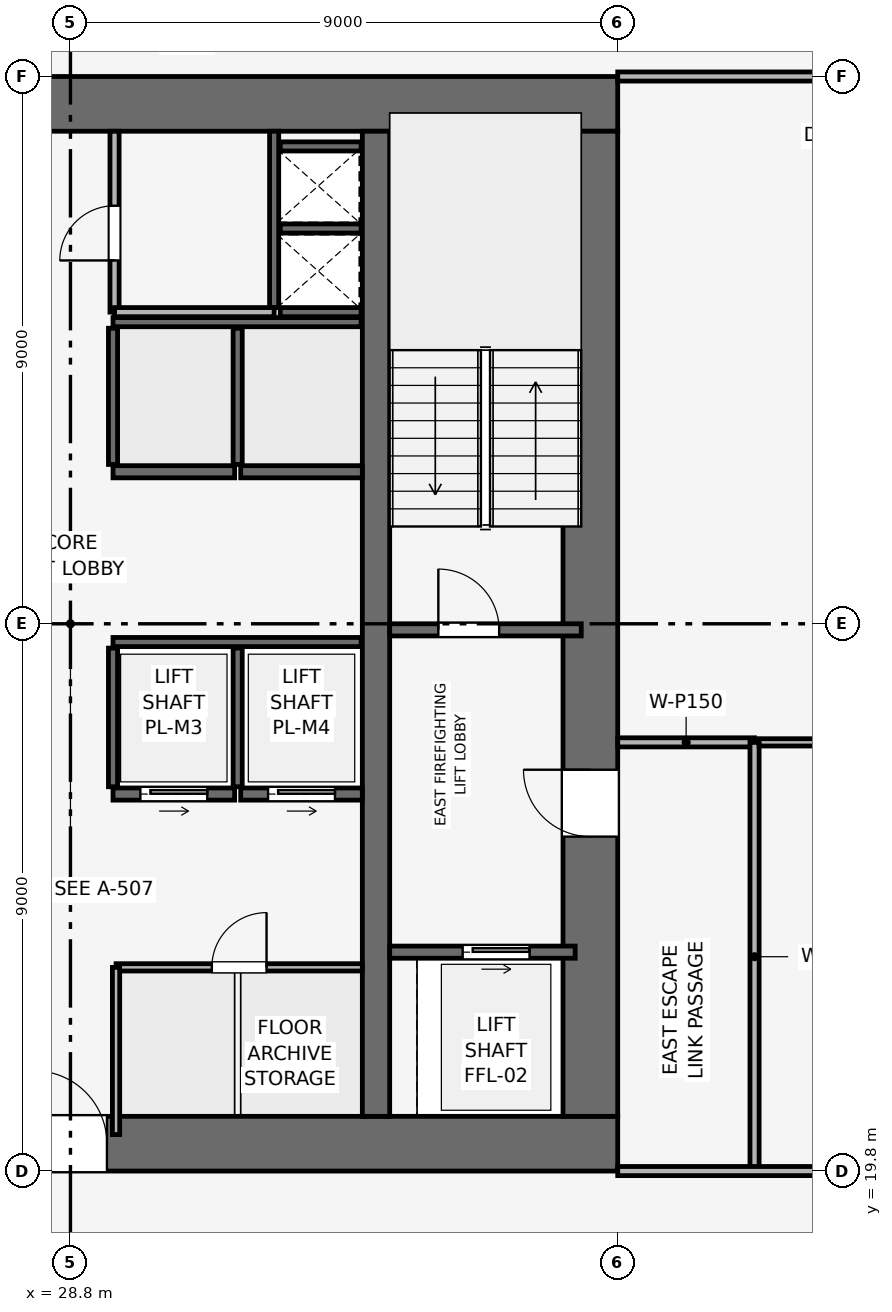
"""IFC4 building model, lengths in metres.
Left out: names, types, materials, properties, quantities, classifications, styles, units other than length and angle.
Written with IfcOpenShell. Run it as: python <this file> out.ifc"""

import sys

from ifc_helpers import new_model, si_unit, direction, frame, frame_2d, origin, place, context, subcontext, project, spatial, rectangle, extrude, element, fill, save


model = new_model("IFC4")
c1 = context("Model", 3, precision=1e-05, world=origin(), true_north=direction((0.0, 1.0)))
c2 = subcontext(c1, "Body", "Model", "MODEL_VIEW")
j1 = project(units=[si_unit("LENGTHUNIT", "METRE"), si_unit("PLANEANGLEUNIT", "RADIAN")], contexts=[c1])
p1 = place(None, origin())
s1 = spatial("IfcSite", under=j1, at=p1, CompositionType="ELEMENT")
p2 = place(p1, origin())
s2 = spatial("IfcBuilding", under=s1, at=p2, CompositionType="ELEMENT")
p3 = place(p2, frame((0.0, 0.0, 145.8)))
s3 = spatial("IfcBuildingStorey", under=s2, at=p3, CompositionType="ELEMENT", Elevation=145.8)
p4 = place(p3, frame((19.8, 20.25, 0.0), z_axis=(0.0, 0.0, 1.0), x_axis=(1.0, 0.0, 0.0)))
e1 = element("IfcWall", 1, at=p4, inside=s3, PredefinedType="SHEAR", context=c2, shape_type="SweptSolid", body=[
    extrude(rectangle(XDim=18.0, YDim=0.9, at=frame_2d((9.0, 0.0))), origin(), (0.0, 0.0, 1.0), 3.75),
])
p5 = place(p4, frame((8.4, 0.0, 0.0)))
e2 = element("IfcOpeningElement", 2, at=p5, cuts=e1, PredefinedType="OPENING", context=c2, shape_type="SweptSolid", body=[
    extrude(rectangle(XDim=1.2, YDim=2.2, at=frame_2d((0.6, 1.1))), frame((0.0, 0.46, 0.0), z_axis=(0.0, -1.0, 0.0), x_axis=(1.0, 0.0, 0.0)), (0.0, 0.0, 1.0), 0.92),
])
p6 = place(p3, frame((19.8, 37.35, 0.0), z_axis=(0.0, 0.0, 1.0), x_axis=(1.0, 0.0, 0.0)))
e3 = element("IfcWall", 3, at=p6, inside=s3, PredefinedType="SHEAR", context=c2, shape_type="SweptSolid", body=[
    extrude(rectangle(XDim=18.0, YDim=0.9, at=frame_2d((9.0, 0.0))), origin(), (0.0, 0.0, 1.0), 3.75),
])
p7 = place(p6, frame((7.05, 0.0, 0.0)))
e4 = element("IfcOpeningElement", 4, at=p7, cuts=e3, PredefinedType="OPENING", context=c2, shape_type="SweptSolid", body=[
    extrude(rectangle(XDim=1.1, YDim=2.15, at=frame_2d((0.55, 1.075))), frame((0.0, 0.46, 0.0), z_axis=(0.0, -1.0, 0.0), x_axis=(1.0, 0.0, 0.0)), (0.0, 0.0, 1.0), 0.92),
])
p8 = place(p3, frame((37.35, 20.7, 0.0), z_axis=(0.0, 0.0, 1.0), x_axis=(0.0, 1.0, 0.0)))
e5 = element("IfcWall", 5, at=p8, inside=s3, PredefinedType="SHEAR", context=c2, shape_type="SweptSolid", body=[
    extrude(rectangle(XDim=16.2, YDim=0.9, at=frame_2d((8.1, 0.0))), origin(), (0.0, 0.0, 1.0), 3.75),
])
p9 = place(p8, frame((4.6, 0.0, 0.0)))
e6 = element("IfcOpeningElement", 6, at=p9, cuts=e5, PredefinedType="OPENING", context=c2, shape_type="SweptSolid", body=[
    extrude(rectangle(XDim=1.1, YDim=2.15, at=frame_2d((0.55, 1.075))), frame((0.0, 0.46, 0.0), z_axis=(0.0, -1.0, 0.0), x_axis=(1.0, 0.0, 0.0)), (0.0, 0.0, 1.0), 0.92),
])
p10 = place(p3, frame((33.825, 20.7, 0.0), z_axis=(0.0, 0.0, 1.0), x_axis=(0.0, 1.0, 0.0)))
e7 = element("IfcWall", 7, at=p10, inside=s3, PredefinedType="SHEAR", context=c2, shape_type="SweptSolid", body=[
    extrude(rectangle(XDim=16.2, YDim=0.45, at=frame_2d((8.1, 0.0))), origin(), (0.0, 0.0, 1.0), 3.75),
])
p11 = place(p3, frame((34.05, 28.7, 0.0), z_axis=(0.0, 0.0, 1.0), x_axis=(1.0, 0.0, 0.0)))
e8 = element("IfcWall", 8, at=p11, inside=s3, PredefinedType="SHEAR", context=c2, shape_type="SweptSolid", body=[
    extrude(rectangle(XDim=3.15, YDim=0.2, at=frame_2d((1.575, 0.0))), origin(), (0.0, 0.0, 1.0), 3.495),
])
p12 = place(p11, frame((0.8, 0.0, 0.0)))
e9 = element("IfcOpeningElement", 9, at=p12, cuts=e8, PredefinedType="OPENING", context=c2, shape_type="SweptSolid", body=[
    extrude(rectangle(XDim=1.0, YDim=2.1, at=frame_2d((0.5, 1.05))), frame((0.0, 0.11, 0.0), z_axis=(0.0, -1.0, 0.0), x_axis=(1.0, 0.0, 0.0)), (0.0, 0.0, 1.0), 0.22),
])
p13 = place(p3, frame((32.15, 34.0, 0.0), z_axis=(0.0, 0.0, 1.0), x_axis=(0.0, 1.0, 0.0)))
e10 = element("IfcWall", 10, at=p13, inside=s3, PredefinedType="SHEAR", context=c2, shape_type="SweptSolid", body=[
    extrude(rectangle(XDim=2.9, YDim=0.15, at=frame_2d((1.45, 0.0))), origin(), (0.0, 0.0, 1.0), 3.495),
])
for number, where, z_axis, x_axis in (
    (11, (32.25, 33.925, 0.0), (0.0, 0.0, 1.0), (1.0, 0.0, 0.0)),
    (12, (32.25, 35.3, 0.0), (0.0, 0.0, 1.0), (1.0, 0.0, 0.0)),
):
    element("IfcWall", number, at=place(p3, frame(where, z_axis=z_axis, x_axis=x_axis)), inside=s3, PredefinedType="SHEAR", context=c2, shape_type="SweptSolid", body=[
        extrude(rectangle(XDim=1.33, YDim=0.15, at=frame_2d((0.665, 0.0))), origin(), (0.0, 0.0, 1.0), 3.495),
    ])
p14 = place(p3, frame((34.05, 23.4, 0.0), z_axis=(0.0, 0.0, 1.0), x_axis=(1.0, 0.0, 0.0)))
e13 = element("IfcWall", 13, at=p14, inside=s3, PredefinedType="SHEAR", context=c2, shape_type="SweptSolid", body=[
    extrude(rectangle(XDim=3.05, YDim=0.2, at=frame_2d((1.525, 0.0))), origin(), (0.0, 0.0, 1.0), 3.495),
])
p15 = place(p14, frame((1.2, 0.0, 0.0)))
e14 = element("IfcOpeningElement", 14, at=p15, cuts=e13, PredefinedType="OPENING", context=c2, shape_type="SweptSolid", body=[
    extrude(rectangle(XDim=1.1, YDim=2.15, at=frame_2d((0.55, 1.075))), frame((0.0, 0.11, 0.0), z_axis=(0.0, -1.0, 0.0), x_axis=(1.0, 0.0, 0.0)), (0.0, 0.0, 1.0), 0.22),
])
p16 = place(p3, frame((29.5, 26.0, 0.0), z_axis=(0.0, 0.0, 1.0), x_axis=(1.0, 0.0, 0.0)))
e15 = element("IfcWall", 15, at=p16, inside=s3, PredefinedType="SHEAR", context=c2, shape_type="SweptSolid", body=[
    extrude(rectangle(XDim=2.0, YDim=0.2, at=frame_2d((1.0, 0.0))), origin(), (0.0, 0.0, 1.0), 3.495),
])
p17 = place(p16, frame((0.45, 0.0, 0.0)))
e16 = element("IfcOpeningElement", 16, at=p17, cuts=e15, PredefinedType="OPENING", context=c2, shape_type="SweptSolid", body=[
    extrude(rectangle(XDim=1.1, YDim=2.15, at=frame_2d((0.55, 1.075))), frame((0.0, 0.11, 0.0), z_axis=(0.0, -1.0, 0.0), x_axis=(1.0, 0.0, 0.0)), (0.0, 0.0, 1.0), 0.22),
])
p18 = place(p3, frame((31.6, 26.0, 0.0), z_axis=(0.0, 0.0, 1.0), x_axis=(1.0, 0.0, 0.0)))
e17 = element("IfcWall", 17, at=p18, inside=s3, PredefinedType="SHEAR", context=c2, shape_type="SweptSolid", body=[
    extrude(rectangle(XDim=2.0, YDim=0.2, at=frame_2d((1.0, 0.0))), origin(), (0.0, 0.0, 1.0), 3.495),
])
p19 = place(p18, frame((0.45, 0.0, 0.0)))
e18 = element("IfcOpeningElement", 18, at=p19, cuts=e17, PredefinedType="OPENING", context=c2, shape_type="SweptSolid", body=[
    extrude(rectangle(XDim=1.1, YDim=2.15, at=frame_2d((0.55, 1.075))), frame((0.0, 0.11, 0.0), z_axis=(0.0, -1.0, 0.0), x_axis=(1.0, 0.0, 0.0)), (0.0, 0.0, 1.0), 0.22),
])
for number, where, z_axis, x_axis in (
    (19, (29.5, 31.3, 0.0), (0.0, 0.0, 1.0), (1.0, 0.0, 0.0)),
    (20, (31.6, 31.3, 0.0), (0.0, 0.0, 1.0), (1.0, 0.0, 0.0)),
):
    element("IfcWall", number, at=place(p3, frame(where, z_axis=z_axis, x_axis=x_axis)), inside=s3, PredefinedType="SHEAR", context=c2, shape_type="SweptSolid", body=[
        extrude(rectangle(XDim=2.0, YDim=0.2, at=frame_2d((1.0, 0.0))), origin(), (0.0, 0.0, 1.0), 3.495),
    ])
p20 = place(p3, frame((32.25, 36.65, 0.0), z_axis=(0.0, 0.0, 1.0), x_axis=(1.0, 0.0, 0.0)))
e21 = element("IfcWall", 21, at=p20, inside=s3, PredefinedType="SHEAR", context=c2, shape_type="SweptSolid", body=[
    extrude(rectangle(XDim=1.33, YDim=0.15, at=frame_2d((0.665, 0.0))), origin(), (0.0, 0.0, 1.0), 3.495),
])
p21 = place(p3, frame((29.5, 28.5, 0.0), z_axis=(0.0, 0.0, 1.0), x_axis=(1.0, 0.0, 0.0)))
e22 = element("IfcWall", 22, at=p21, inside=s3, PredefinedType="SHEAR", context=c2, shape_type="SweptSolid", body=[
    extrude(rectangle(XDim=4.08, YDim=0.15, at=frame_2d((2.04, 0.0))), origin(), (0.0, 0.0, 1.0), 3.495),
])
for number, where, z_axis, x_axis in (
    (23, (29.5, 26.12, 0.0), (0.0, 0.0, 1.0), (0.0, 1.0, 0.0)),
    (24, (31.55, 26.12, 0.0), (0.0, 0.0, 1.0), (0.0, 1.0, 0.0)),
):
    element("IfcWall", number, at=place(p3, frame(where, z_axis=z_axis, x_axis=x_axis)), inside=s3, PredefinedType="SHEAR", context=c2, shape_type="SweptSolid", body=[
        extrude(rectangle(XDim=2.28, YDim=0.15, at=frame_2d((1.14, 0.0))), origin(), (0.0, 0.0, 1.0), 3.495),
    ])
p22 = place(p3, frame((29.5, 33.76, 0.0), z_axis=(0.0, 0.0, 1.0), x_axis=(1.0, 0.0, 0.0)))
e25 = element("IfcWall", 25, at=p22, inside=s3, PredefinedType="SHEAR", context=c2, shape_type="SweptSolid", body=[
    extrude(rectangle(XDim=4.08, YDim=0.15, at=frame_2d((2.04, 0.0))), origin(), (0.0, 0.0, 1.0), 3.495),
])
for number, where, z_axis, x_axis in (
    (26, (29.5, 31.42, 0.0), (0.0, 0.0, 1.0), (0.0, 1.0, 0.0)),
    (27, (31.55, 31.42, 0.0), (0.0, 0.0, 1.0), (0.0, 1.0, 0.0)),
):
    element("IfcWall", number, at=place(p3, frame(where, z_axis=z_axis, x_axis=x_axis)), inside=s3, PredefinedType="SHEAR", context=c2, shape_type="SweptSolid", body=[
        extrude(rectangle(XDim=2.24, YDim=0.15, at=frame_2d((1.12, 0.0))), origin(), (0.0, 0.0, 1.0), 3.495),
    ])
p23 = place(p3, frame((29.525, 33.925, 0.0), z_axis=(0.0, 0.0, 1.0), x_axis=(0.0, 1.0, 0.0)))
e28 = element("IfcWall", 28, at=p23, inside=s3, PredefinedType="PARTITIONING", context=c2, shape_type="SweptSolid", body=[
    extrude(rectangle(XDim=2.975, YDim=0.15, at=frame_2d((1.487, 0.0))), origin(), (0.0, 0.0, 1.0), 3.495),
])
p24 = place(p23, frame((0.85, 0.0, 0.0)))
e29 = element("IfcOpeningElement", 29, at=p24, cuts=e28, PredefinedType="OPENING", context=c2, shape_type="SweptSolid", body=[
    extrude(rectangle(XDim=0.9, YDim=2.1, at=frame_2d((0.45, 1.05))), frame((0.0, 0.085, 0.0), z_axis=(0.0, -1.0, 0.0), x_axis=(1.0, 0.0, 0.0)), (0.0, 0.0, 1.0), 0.17),
])
p25 = place(p3, frame((29.525, 33.925, 0.0), z_axis=(0.0, 0.0, 1.0), x_axis=(1.0, 0.0, 0.0)))
e30 = element("IfcWall", 30, at=p25, inside=s3, PredefinedType="PARTITIONING", context=c2, shape_type="SweptSolid", body=[
    extrude(rectangle(XDim=2.625, YDim=0.15, at=frame_2d((1.312, 0.0))), origin(), (0.0, 0.0, 1.0), 3.495),
])
p26 = place(p3, frame((29.55, 23.15, 0.0), z_axis=(0.0, 0.0, 1.0), x_axis=(1.0, 0.0, 0.0)))
e31 = element("IfcWall", 31, at=p26, inside=s3, PredefinedType="PARTITIONING", context=c2, shape_type="SweptSolid", body=[
    extrude(rectangle(XDim=4.05, YDim=0.12, at=frame_2d((2.025, 0.0))), origin(), (0.0, 0.0, 1.0), 3.495),
])
p27 = place(p26, frame((1.575, 0.0, 0.0)))
e32 = element("IfcOpeningElement", 32, at=p27, cuts=e31, PredefinedType="OPENING", context=c2, shape_type="SweptSolid", body=[
    extrude(rectangle(XDim=0.9, YDim=2.1, at=frame_2d((0.45, 1.05))), frame((0.0, 0.07, 0.0), z_axis=(0.0, -1.0, 0.0), x_axis=(1.0, 0.0, 0.0)), (0.0, 0.0, 1.0), 0.14),
])
p28 = place(p3, frame((29.55, 20.4, 0.0), z_axis=(0.0, 0.0, 1.0), x_axis=(0.0, 1.0, 0.0)))
e33 = element("IfcWall", 33, at=p28, inside=s3, PredefinedType="PARTITIONING", context=c2, shape_type="SweptSolid", body=[
    extrude(rectangle(XDim=2.75, YDim=0.12, at=frame_2d((1.375, 0.0))), origin(), (0.0, 0.0, 1.0), 3.495),
])
p29 = place(p3, frame((37.8, 26.85, 0.0), z_axis=(0.0, 0.0, 1.0), x_axis=(1.0, 0.0, 0.0)))
e34 = element("IfcWall", 34, at=p29, inside=s3, PredefinedType="PARTITIONING", context=c2, shape_type="SweptSolid", body=[
    extrude(rectangle(XDim=2.25, YDim=0.15, at=frame_2d((1.125, 0.0))), origin(), (0.0, 0.0, 1.0), 3.495),
])
p30 = place(p3, frame((40.05, 19.8, 0.0), z_axis=(0.0, 0.0, 1.0), x_axis=(0.0, 1.0, 0.0)))
e35 = element("IfcWall", 35, at=p30, inside=s3, PredefinedType="PARTITIONING", context=c2, shape_type="SweptSolid", body=[
    extrude(rectangle(XDim=7.05, YDim=0.15, at=frame_2d((3.525, 0.0))), origin(), (0.0, 0.0, 1.0), 3.03),
])
p31 = place(p3, frame((40.125, 26.85, 0.0), z_axis=(0.0, 0.0, 1.0), x_axis=(1.0, 0.0, 0.0)))
e36 = element("IfcWall", 36, at=p31, inside=s3, PredefinedType="PARTITIONING", context=c2, shape_type="SweptSolid", body=[
    extrude(rectangle(XDim=12.845, YDim=0.12, at=frame_2d((6.422, 0.0))), origin(), (0.0, 0.0, 1.0), 2.98),
])
p32 = place(p3, frame((37.8, 19.8, 0.0), z_axis=(0.0, 0.0, 1.0), x_axis=(1.0, 0.0, 0.0)))
e37 = element("IfcWall", 37, at=p32, inside=s3, PredefinedType="PARTITIONING", context=c2, shape_type="SweptSolid", body=[
    extrude(rectangle(XDim=15.17, YDim=0.15, at=frame_2d((7.585, 0.0))), origin(), (0.0, 0.0, 1.0), 2.98),
])
p33 = place(p32, frame((4.4, 0.0, 0.0)))
e38 = element("IfcOpeningElement", 38, at=p33, cuts=e37, PredefinedType="OPENING", context=c2, shape_type="SweptSolid", body=[
    extrude(rectangle(XDim=0.9, YDim=2.1, at=frame_2d((0.45, 1.05))), frame((0.0, 0.085, 0.0), z_axis=(0.0, -1.0, 0.0), x_axis=(1.0, 0.0, 0.0)), (0.0, 0.0, 1.0), 0.17),
])
p34 = place(p3, frame((37.8, 37.8, 0.0), z_axis=(0.0, 0.0, 1.0), x_axis=(1.0, 0.0, 0.0)))
e39 = element("IfcWall", 39, at=p34, inside=s3, PredefinedType="PARTITIONING", context=c2, shape_type="SweptSolid", body=[
    extrude(rectangle(XDim=15.17, YDim=0.15, at=frame_2d((7.585, 0.0))), origin(), (0.0, 0.0, 1.0), 2.98),
])
p35 = place(p34, frame((3.4, 0.0, 0.0)))
e40 = element("IfcOpeningElement", 40, at=p35, cuts=e39, PredefinedType="OPENING", context=c2, shape_type="SweptSolid", body=[
    extrude(rectangle(XDim=0.9, YDim=2.1, at=frame_2d((0.45, 1.05))), frame((0.0, 0.085, 0.0), z_axis=(0.0, -1.0, 0.0), x_axis=(1.0, 0.0, 0.0)), (0.0, 0.0, 1.0), 0.17),
])
p36 = place(p12, origin())
e41 = element("IfcDoor", 41, at=p36, inside=s3, OperationType="SINGLE_SWING_LEFT", PredefinedType="DOOR", context=c2, shape_type="SweptSolid", body=[
    extrude(rectangle(XDim=1.0, YDim=2.1, at=frame_2d((0.5, 1.05))), frame((0.0, 0.025, 0.0), z_axis=(0.0, -1.0, 0.0), x_axis=(1.0, 0.0, 0.0)), (0.0, 0.0, 1.0), 0.05),
])
fill(e9, e41)
p37 = place(p15, origin())
e42 = element("IfcDoor", 42, at=p37, inside=s3, OperationType="SLIDING_TO_RIGHT", PredefinedType="DOOR", context=c2, shape_type="SweptSolid", body=[
    extrude(rectangle(XDim=1.1, YDim=2.15, at=frame_2d((0.55, 1.075))), frame((0.0, 0.025, 0.0), z_axis=(0.0, -1.0, 0.0), x_axis=(1.0, 0.0, 0.0)), (0.0, 0.0, 1.0), 0.05),
])
fill(e14, e42)
p38 = place(p17, origin())
e43 = element("IfcDoor", 43, at=p38, inside=s3, OperationType="SLIDING_TO_RIGHT", PredefinedType="DOOR", context=c2, shape_type="SweptSolid", body=[
    extrude(rectangle(XDim=1.1, YDim=2.15, at=frame_2d((0.55, 1.075))), frame((0.0, 0.025, 0.0), z_axis=(0.0, -1.0, 0.0), x_axis=(1.0, 0.0, 0.0)), (0.0, 0.0, 1.0), 0.05),
])
fill(e16, e43)
p39 = place(p19, origin())
e44 = element("IfcDoor", 44, at=p39, inside=s3, OperationType="SLIDING_TO_RIGHT", PredefinedType="DOOR", context=c2, shape_type="SweptSolid", body=[
    extrude(rectangle(XDim=1.1, YDim=2.15, at=frame_2d((0.55, 1.075))), frame((0.0, 0.025, 0.0), z_axis=(0.0, -1.0, 0.0), x_axis=(1.0, 0.0, 0.0)), (0.0, 0.0, 1.0), 0.05),
])
fill(e18, e44)
p40 = place(p24, origin())
e45 = element("IfcDoor", 45, at=p40, inside=s3, OperationType="SINGLE_SWING_LEFT", PredefinedType="DOOR", context=c2, shape_type="SweptSolid", body=[
    extrude(rectangle(XDim=0.9, YDim=2.1, at=frame_2d((0.45, 1.05))), frame((0.0, 0.025, 0.0), z_axis=(0.0, -1.0, 0.0), x_axis=(1.0, 0.0, 0.0)), (0.0, 0.0, 1.0), 0.05),
])
fill(e29, e45)
p41 = place(p27, origin())
e46 = element("IfcDoor", 46, at=p41, inside=s3, OperationType="SINGLE_SWING_RIGHT", PredefinedType="DOOR", context=c2, shape_type="SweptSolid", body=[
    extrude(rectangle(XDim=0.9, YDim=2.1, at=frame_2d((0.45, 1.05))), frame((0.0, 0.025, 0.0), z_axis=(0.0, -1.0, 0.0), x_axis=(1.0, 0.0, 0.0)), (0.0, 0.0, 1.0), 0.05),
])
fill(e32, e46)
p42 = place(p9, origin())
e47 = element("IfcDoor", 47, at=p42, inside=s3, OperationType="SINGLE_SWING_RIGHT", PredefinedType="DOOR", context=c2, shape_type="SweptSolid", body=[
    extrude(rectangle(XDim=1.1, YDim=2.15, at=frame_2d((0.55, 1.075))), frame((0.0, 0.025, 0.0), z_axis=(0.0, -1.0, 0.0), x_axis=(1.0, 0.0, 0.0)), (0.0, 0.0, 1.0), 0.05),
])
fill(e6, e47)
p43 = place(p5, origin())
e48 = element("IfcDoor", 48, at=p43, inside=s3, OperationType="SINGLE_SWING_LEFT", PredefinedType="DOOR", context=c2, shape_type="SweptSolid", body=[
    extrude(rectangle(XDim=1.2, YDim=2.2, at=frame_2d((0.6, 1.1))), frame((0.0, 0.025, 0.0), z_axis=(0.0, -1.0, 0.0), x_axis=(1.0, 0.0, 0.0)), (0.0, 0.0, 1.0), 0.05),
])
fill(e2, e48)
save(model, sys.argv[1])
